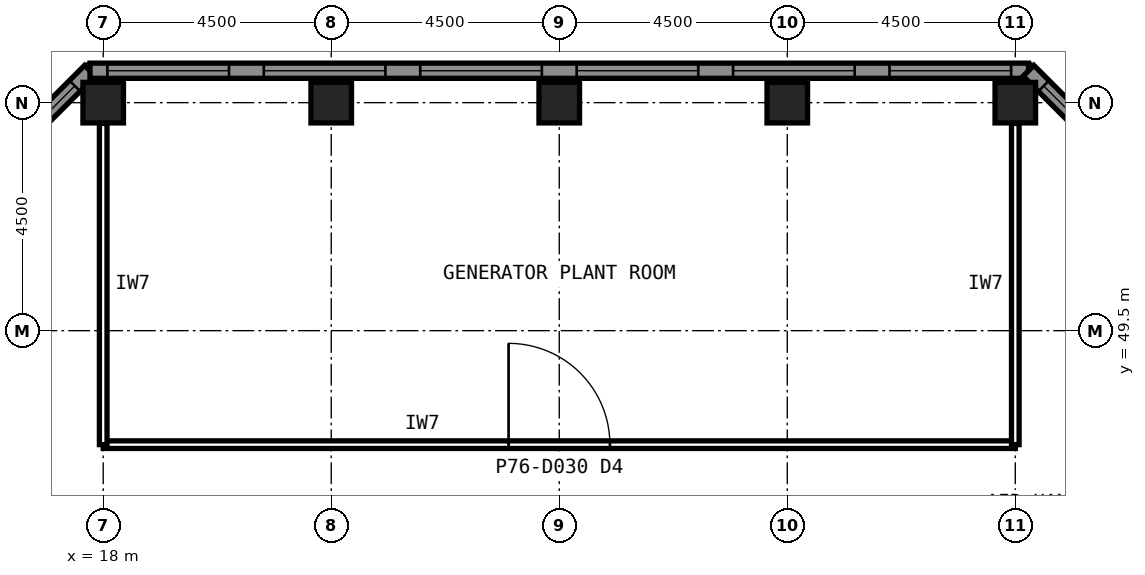
"""IFC4 building model, lengths in metres.
Left out: names, types, materials, properties, quantities, classifications, styles, units other than length and angle.
Written with IfcOpenShell. Run it as: python <this file> out.ifc"""

import sys

from ifc_helpers import new_model, si_unit, direction, frame, frame_2d, origin, origin_2d, place, context, subcontext, project, spatial, polyline, rectangle, hollow_rectangle, outline, extrude, element, fill, save


model = new_model("IFC4")
c1 = context("Model", 3, precision=1e-05, world=origin(), true_north=direction((0.0, 1.0)))
c2 = subcontext(c1, "Body", "Model", "MODEL_VIEW")
j1 = project(units=[si_unit("LENGTHUNIT", "METRE"), si_unit("PLANEANGLEUNIT", "RADIAN")], contexts=[c1])
p1 = place(None, origin())
s1 = spatial("IfcSite", under=j1, at=p1, CompositionType="ELEMENT")
p2 = place(p1, origin())
s2 = spatial("IfcBuilding", under=s1, at=p2, CompositionType="ELEMENT")
p3 = place(p2, frame((0.0, 0.0, 320.1)))
s3 = spatial("IfcBuildingStorey", under=s2, at=p3, CompositionType="ELEMENT", Elevation=320.1)
for number, where, z_axis, x_axis in (
    (1, (36.0, 54.0, 0.0), (0.0, 0.0, 1.0), (1.0, 0.0, 0.0)),
    (2, (31.5, 54.0, 0.0), (0.0, 0.0, 1.0), (1.0, 0.0, 0.0)),
    (3, (27.0, 54.0, 0.0), (0.0, 0.0, 1.0), (1.0, 0.0, 0.0)),
    (4, (22.5, 54.0, 0.0), (0.0, 0.0, 1.0), (1.0, 0.0, 0.0)),
    (5, (18.0, 54.0, 0.0), (0.0, 0.0, 1.0), (1.0, 0.0, 0.0)),
):
    element("IfcColumn", number, at=place(p3, frame(where, z_axis=z_axis, x_axis=x_axis)), inside=s3, PredefinedType="COLUMN", context=c2, shape_type="SweptSolid", body=[
        extrude(hollow_rectangle(XDim=0.8, YDim=0.8, WallThickness=0.045, at=origin_2d()), origin(), (0.0, 0.0, 1.0), 21.427),
    ])
p4 = place(p3, frame((-0.63, 36.261, 0.0), z_axis=(0.0, 0.0, 1.0), x_axis=(0.707106781187, 0.707106781187, 0.0)))
e6 = element("IfcWall", 6, at=p4, inside=s3, PredefinedType="SOLIDWALL", context=c2, shape_type="SweptSolid", body=[
    extrude(outline(polyline([(0.0, 0.0), (25.978, 0.0), (25.978, 23.789), (0.0, 18.278), (0.0, 0.0)])), frame((0.0, 0.15, 0.0), z_axis=(0.0, -1.0, 0.0), x_axis=(1.0, 0.0, 0.0)), (0.0, 0.0, 1.0), 0.3),
])
p5 = place(p4, frame((0.424, 0.0, 1.2)))
e7 = element("IfcOpeningElement", 7, at=p5, cuts=e6, PredefinedType="OPENING", context=c2, shape_type="SweptSolid", body=[
    extrude(rectangle(XDim=2.4, YDim=2.4, at=frame_2d((1.2, 1.2))), frame((0.0, 0.16, 0.0), z_axis=(0.0, -1.0, 0.0), x_axis=(1.0, 0.0, 0.0)), (0.0, 0.0, 1.0), 0.32),
])
p6 = place(p4, frame((3.671, 0.0, 1.2)))
e8 = element("IfcOpeningElement", 8, at=p6, cuts=e6, PredefinedType="OPENING", context=c2, shape_type="SweptSolid", body=[
    extrude(rectangle(XDim=2.4, YDim=2.4, at=frame_2d((1.2, 1.2))), frame((0.0, 0.16, 0.0), z_axis=(0.0, -1.0, 0.0), x_axis=(1.0, 0.0, 0.0)), (0.0, 0.0, 1.0), 0.32),
])
p7 = place(p4, frame((6.918, 0.0, 1.2)))
e9 = element("IfcOpeningElement", 9, at=p7, cuts=e6, PredefinedType="OPENING", context=c2, shape_type="SweptSolid", body=[
    extrude(rectangle(XDim=2.4, YDim=2.4, at=frame_2d((1.2, 1.2))), frame((0.0, 0.16, 0.0), z_axis=(0.0, -1.0, 0.0), x_axis=(1.0, 0.0, 0.0)), (0.0, 0.0, 1.0), 0.32),
])
p8 = place(p4, frame((10.165, 0.0, 1.2)))
e10 = element("IfcOpeningElement", 10, at=p8, cuts=e6, PredefinedType="OPENING", context=c2, shape_type="SweptSolid", body=[
    extrude(rectangle(XDim=2.4, YDim=2.4, at=frame_2d((1.2, 1.2))), frame((0.0, 0.16, 0.0), z_axis=(0.0, -1.0, 0.0), x_axis=(1.0, 0.0, 0.0)), (0.0, 0.0, 1.0), 0.32),
])
p9 = place(p4, frame((13.412, 0.0, 11.15)))
e11 = element("IfcOpeningElement", 11, at=p9, cuts=e6, PredefinedType="OPENING", context=c2, shape_type="SweptSolid", body=[
    extrude(rectangle(XDim=2.4, YDim=2.4, at=frame_2d((1.2, 1.2))), frame((0.0, 0.16, 0.0), z_axis=(0.0, -1.0, 0.0), x_axis=(1.0, 0.0, 0.0)), (0.0, 0.0, 1.0), 0.32),
])
p10 = place(p4, frame((16.66, 0.0, 11.3)))
e12 = element("IfcOpeningElement", 12, at=p10, cuts=e6, PredefinedType="OPENING", context=c2, shape_type="SweptSolid", body=[
    extrude(rectangle(XDim=2.4, YDim=2.4, at=frame_2d((1.2, 1.2))), frame((0.0, 0.16, 0.0), z_axis=(0.0, -1.0, 0.0), x_axis=(1.0, 0.0, 0.0)), (0.0, 0.0, 1.0), 0.32),
])
p11 = place(p4, frame((19.907, 0.0, 1.2)))
e13 = element("IfcOpeningElement", 13, at=p11, cuts=e6, PredefinedType="OPENING", context=c2, shape_type="SweptSolid", body=[
    extrude(rectangle(XDim=2.4, YDim=2.4, at=frame_2d((1.2, 1.2))), frame((0.0, 0.16, 0.0), z_axis=(0.0, -1.0, 0.0), x_axis=(1.0, 0.0, 0.0)), (0.0, 0.0, 1.0), 0.32),
])
p12 = place(p4, frame((23.154, 0.0, 1.2)))
e14 = element("IfcOpeningElement", 14, at=p12, cuts=e6, PredefinedType="OPENING", context=c2, shape_type="SweptSolid", body=[
    extrude(rectangle(XDim=2.4, YDim=2.4, at=frame_2d((1.2, 1.2))), frame((0.0, 0.16, 0.0), z_axis=(0.0, -1.0, 0.0), x_axis=(1.0, 0.0, 0.0)), (0.0, 0.0, 1.0), 0.32),
])
p13 = place(p3, frame((17.739, 54.63, 0.0), z_axis=(0.0, 0.0, 1.0), x_axis=(1.0, 0.0, 0.0)))
e15 = element("IfcWall", 15, at=p13, inside=s3, PredefinedType="SOLIDWALL", context=c2, shape_type="SweptSolid", body=[
    extrude(rectangle(XDim=18.522, YDim=0.3, at=frame_2d((9.261, 0.0))), origin(), (0.0, 0.0, 1.0), 23.789),
])
p14 = place(p13, frame((0.344, 0.0, 17.4)))
e16 = element("IfcOpeningElement", 16, at=p14, cuts=e15, PredefinedType="OPENING", context=c2, shape_type="SweptSolid", body=[
    extrude(rectangle(XDim=2.4, YDim=2.4, at=frame_2d((1.2, 1.2))), frame((0.0, 0.16, 0.0), z_axis=(0.0, -1.0, 0.0), x_axis=(1.0, 0.0, 0.0)), (0.0, 0.0, 1.0), 0.32),
])
p15 = place(p13, frame((3.43, 0.0, 1.65)))
e17 = element("IfcOpeningElement", 17, at=p15, cuts=e15, PredefinedType="OPENING", context=c2, shape_type="SweptSolid", body=[
    extrude(rectangle(XDim=2.4, YDim=2.4, at=frame_2d((1.2, 1.2))), frame((0.0, 0.16, 0.0), z_axis=(0.0, -1.0, 0.0), x_axis=(1.0, 0.0, 0.0)), (0.0, 0.0, 1.0), 0.32),
])
p16 = place(p13, frame((6.518, 0.0, 1.2)))
e18 = element("IfcOpeningElement", 18, at=p16, cuts=e15, PredefinedType="OPENING", context=c2, shape_type="SweptSolid", body=[
    extrude(rectangle(XDim=2.4, YDim=2.4, at=frame_2d((1.2, 1.2))), frame((0.0, 0.16, 0.0), z_axis=(0.0, -1.0, 0.0), x_axis=(1.0, 0.0, 0.0)), (0.0, 0.0, 1.0), 0.32),
])
p17 = place(p13, frame((9.604, 0.0, 1.2)))
e19 = element("IfcOpeningElement", 19, at=p17, cuts=e15, PredefinedType="OPENING", context=c2, shape_type="SweptSolid", body=[
    extrude(rectangle(XDim=2.4, YDim=2.4, at=frame_2d((1.2, 1.2))), frame((0.0, 0.16, 0.0), z_axis=(0.0, -1.0, 0.0), x_axis=(1.0, 0.0, 0.0)), (0.0, 0.0, 1.0), 0.32),
])
p18 = place(p13, frame((12.691, 0.0, 1.65)))
e20 = element("IfcOpeningElement", 20, at=p18, cuts=e15, PredefinedType="OPENING", context=c2, shape_type="SweptSolid", body=[
    extrude(rectangle(XDim=2.4, YDim=2.4, at=frame_2d((1.2, 1.2))), frame((0.0, 0.16, 0.0), z_axis=(0.0, -1.0, 0.0), x_axis=(1.0, 0.0, 0.0)), (0.0, 0.0, 1.0), 0.32),
])
p19 = place(p13, frame((15.779, 0.0, 17.4)))
e21 = element("IfcOpeningElement", 21, at=p19, cuts=e15, PredefinedType="OPENING", context=c2, shape_type="SweptSolid", body=[
    extrude(rectangle(XDim=2.4, YDim=2.4, at=frame_2d((1.2, 1.2))), frame((0.0, 0.16, 0.0), z_axis=(0.0, -1.0, 0.0), x_axis=(1.0, 0.0, 0.0)), (0.0, 0.0, 1.0), 0.32),
])
p20 = place(p3, frame((36.261, 54.63, 0.0), z_axis=(0.0, 0.0, 1.0), x_axis=(0.707106781187, -0.707106781187, 0.0)))
e22 = element("IfcWall", 22, at=p20, inside=s3, PredefinedType="SOLIDWALL", context=c2, shape_type="SweptSolid", body=[
    extrude(outline(polyline([(0.0, 0.0), (25.978, 0.0), (25.978, 18.278), (0.0, 23.789), (0.0, 0.0)])), frame((0.0, 0.15, 0.0), z_axis=(0.0, -1.0, 0.0), x_axis=(1.0, 0.0, 0.0)), (0.0, 0.0, 1.0), 0.3),
])
p21 = place(p20, frame((0.424, 0.0, 1.2)))
e23 = element("IfcOpeningElement", 23, at=p21, cuts=e22, PredefinedType="OPENING", context=c2, shape_type="SweptSolid", body=[
    extrude(rectangle(XDim=2.4, YDim=2.4, at=frame_2d((1.2, 1.2))), frame((0.0, 0.16, 0.0), z_axis=(0.0, -1.0, 0.0), x_axis=(1.0, 0.0, 0.0)), (0.0, 0.0, 1.0), 0.32),
])
p22 = place(p20, frame((3.671, 0.0, 1.2)))
e24 = element("IfcOpeningElement", 24, at=p22, cuts=e22, PredefinedType="OPENING", context=c2, shape_type="SweptSolid", body=[
    extrude(rectangle(XDim=2.4, YDim=2.4, at=frame_2d((1.2, 1.2))), frame((0.0, 0.16, 0.0), z_axis=(0.0, -1.0, 0.0), x_axis=(1.0, 0.0, 0.0)), (0.0, 0.0, 1.0), 0.32),
])
p23 = place(p20, frame((6.918, 0.0, 11.3)))
e25 = element("IfcOpeningElement", 25, at=p23, cuts=e22, PredefinedType="OPENING", context=c2, shape_type="SweptSolid", body=[
    extrude(rectangle(XDim=2.4, YDim=2.4, at=frame_2d((1.2, 1.2))), frame((0.0, 0.16, 0.0), z_axis=(0.0, -1.0, 0.0), x_axis=(1.0, 0.0, 0.0)), (0.0, 0.0, 1.0), 0.32),
])
p24 = place(p20, frame((10.165, 0.0, 11.15)))
e26 = element("IfcOpeningElement", 26, at=p24, cuts=e22, PredefinedType="OPENING", context=c2, shape_type="SweptSolid", body=[
    extrude(rectangle(XDim=2.4, YDim=2.4, at=frame_2d((1.2, 1.2))), frame((0.0, 0.16, 0.0), z_axis=(0.0, -1.0, 0.0), x_axis=(1.0, 0.0, 0.0)), (0.0, 0.0, 1.0), 0.32),
])
p25 = place(p20, frame((13.412, 0.0, 1.2)))
e27 = element("IfcOpeningElement", 27, at=p25, cuts=e22, PredefinedType="OPENING", context=c2, shape_type="SweptSolid", body=[
    extrude(rectangle(XDim=2.4, YDim=2.4, at=frame_2d((1.2, 1.2))), frame((0.0, 0.16, 0.0), z_axis=(0.0, -1.0, 0.0), x_axis=(1.0, 0.0, 0.0)), (0.0, 0.0, 1.0), 0.32),
])
p26 = place(p20, frame((16.66, 0.0, 1.2)))
e28 = element("IfcOpeningElement", 28, at=p26, cuts=e22, PredefinedType="OPENING", context=c2, shape_type="SweptSolid", body=[
    extrude(rectangle(XDim=2.4, YDim=2.4, at=frame_2d((1.2, 1.2))), frame((0.0, 0.16, 0.0), z_axis=(0.0, -1.0, 0.0), x_axis=(1.0, 0.0, 0.0)), (0.0, 0.0, 1.0), 0.32),
])
p27 = place(p20, frame((19.907, 0.0, 1.2)))
e29 = element("IfcOpeningElement", 29, at=p27, cuts=e22, PredefinedType="OPENING", context=c2, shape_type="SweptSolid", body=[
    extrude(rectangle(XDim=2.4, YDim=2.4, at=frame_2d((1.2, 1.2))), frame((0.0, 0.16, 0.0), z_axis=(0.0, -1.0, 0.0), x_axis=(1.0, 0.0, 0.0)), (0.0, 0.0, 1.0), 0.32),
])
p28 = place(p20, frame((23.154, 0.0, 1.2)))
e30 = element("IfcOpeningElement", 30, at=p28, cuts=e22, PredefinedType="OPENING", context=c2, shape_type="SweptSolid", body=[
    extrude(rectangle(XDim=2.4, YDim=2.4, at=frame_2d((1.2, 1.2))), frame((0.0, 0.16, 0.0), z_axis=(0.0, -1.0, 0.0), x_axis=(1.0, 0.0, 0.0)), (0.0, 0.0, 1.0), 0.32),
])
p29 = place(p3, frame((18.0, 47.25, 0.0), z_axis=(0.0, 0.0, 1.0), x_axis=(1.0, 0.0, 0.0)))
e31 = element("IfcWall", 31, at=p29, inside=s3, PredefinedType="PARTITIONING", context=c2, shape_type="SweptSolid", body=[
    extrude(rectangle(XDim=18.0, YDim=0.15, at=frame_2d((9.0, 0.0))), origin(), (0.0, 0.0, 1.0), 4.246),
])
p30 = place(p29, frame((8.0, 0.0, 0.0)))
e32 = element("IfcOpeningElement", 32, at=p30, cuts=e31, PredefinedType="OPENING", context=c2, shape_type="SweptSolid", body=[
    extrude(rectangle(XDim=2.0, YDim=2.4, at=frame_2d((1.0, 1.2))), frame((0.0, 0.085, 0.0), z_axis=(0.0, -1.0, 0.0), x_axis=(1.0, 0.0, 0.0)), (0.0, 0.0, 1.0), 0.17),
])
for number, where, z_axis, x_axis in (
    (33, (36.0, 47.25, 0.0), (0.0, 0.0, 1.0), (0.0, 1.0, 0.0)),
    (34, (18.0, 53.59, 0.0), (0.0, 0.0, 1.0), (0.0, -1.0, 0.0)),
):
    element("IfcWall", number, at=place(p3, frame(where, z_axis=z_axis, x_axis=x_axis)), inside=s3, PredefinedType="PARTITIONING", context=c2, shape_type="SweptSolid", body=[
        extrude(rectangle(XDim=6.34, YDim=0.15, at=frame_2d((3.17, 0.0))), origin(), (0.0, 0.0, 1.0), 4.246),
    ])
p31 = place(p12, origin())
e35 = element("IfcWindow", 35, at=p31, inside=s3, PartitioningType="SINGLE_PANEL", PredefinedType="USERDEFINED", context=c2, shape_type="SweptSolid", body=[
    extrude(rectangle(XDim=2.4, YDim=2.4, at=frame_2d((1.2, 1.2))), frame((0.0, 0.03, 0.0), z_axis=(0.0, -1.0, 0.0), x_axis=(1.0, 0.0, 0.0)), (0.0, 0.0, 1.0), 0.06),
])
fill(e14, e35)
p32 = place(p14, origin())
e36 = element("IfcWindow", 36, at=p32, inside=s3, PartitioningType="SINGLE_PANEL", PredefinedType="USERDEFINED", context=c2, shape_type="SweptSolid", body=[
    extrude(rectangle(XDim=2.4, YDim=2.4, at=frame_2d((1.2, 1.2))), frame((0.0, 0.03, 0.0), z_axis=(0.0, -1.0, 0.0), x_axis=(1.0, 0.0, 0.0)), (0.0, 0.0, 1.0), 0.06),
])
fill(e16, e36)
p33 = place(p15, origin())
e37 = element("IfcWindow", 37, at=p33, inside=s3, PartitioningType="SINGLE_PANEL", PredefinedType="USERDEFINED", context=c2, shape_type="SweptSolid", body=[
    extrude(rectangle(XDim=2.4, YDim=2.4, at=frame_2d((1.2, 1.2))), frame((0.0, 0.03, 0.0), z_axis=(0.0, -1.0, 0.0), x_axis=(1.0, 0.0, 0.0)), (0.0, 0.0, 1.0), 0.06),
])
fill(e17, e37)
p34 = place(p16, origin())
e38 = element("IfcWindow", 38, at=p34, inside=s3, PartitioningType="SINGLE_PANEL", PredefinedType="USERDEFINED", context=c2, shape_type="SweptSolid", body=[
    extrude(rectangle(XDim=2.4, YDim=2.4, at=frame_2d((1.2, 1.2))), frame((0.0, 0.03, 0.0), z_axis=(0.0, -1.0, 0.0), x_axis=(1.0, 0.0, 0.0)), (0.0, 0.0, 1.0), 0.06),
])
fill(e18, e38)
p35 = place(p17, origin())
e39 = element("IfcWindow", 39, at=p35, inside=s3, PartitioningType="SINGLE_PANEL", PredefinedType="USERDEFINED", context=c2, shape_type="SweptSolid", body=[
    extrude(rectangle(XDim=2.4, YDim=2.4, at=frame_2d((1.2, 1.2))), frame((0.0, 0.03, 0.0), z_axis=(0.0, -1.0, 0.0), x_axis=(1.0, 0.0, 0.0)), (0.0, 0.0, 1.0), 0.06),
])
fill(e19, e39)
p36 = place(p18, origin())
e40 = element("IfcWindow", 40, at=p36, inside=s3, PartitioningType="SINGLE_PANEL", PredefinedType="USERDEFINED", context=c2, shape_type="SweptSolid", body=[
    extrude(rectangle(XDim=2.4, YDim=2.4, at=frame_2d((1.2, 1.2))), frame((0.0, 0.03, 0.0), z_axis=(0.0, -1.0, 0.0), x_axis=(1.0, 0.0, 0.0)), (0.0, 0.0, 1.0), 0.06),
])
fill(e20, e40)
p37 = place(p19, origin())
e41 = element("IfcWindow", 41, at=p37, inside=s3, PartitioningType="SINGLE_PANEL", PredefinedType="USERDEFINED", context=c2, shape_type="SweptSolid", body=[
    extrude(rectangle(XDim=2.4, YDim=2.4, at=frame_2d((1.2, 1.2))), frame((0.0, 0.03, 0.0), z_axis=(0.0, -1.0, 0.0), x_axis=(1.0, 0.0, 0.0)), (0.0, 0.0, 1.0), 0.06),
])
fill(e21, e41)
p38 = place(p21, origin())
e42 = element("IfcWindow", 42, at=p38, inside=s3, PartitioningType="SINGLE_PANEL", PredefinedType="USERDEFINED", context=c2, shape_type="SweptSolid", body=[
    extrude(rectangle(XDim=2.4, YDim=2.4, at=frame_2d((1.2, 1.2))), frame((0.0, 0.03, 0.0), z_axis=(0.0, -1.0, 0.0), x_axis=(1.0, 0.0, 0.0)), (0.0, 0.0, 1.0), 0.06),
])
fill(e23, e42)
p39 = place(p30, origin())
e43 = element("IfcDoor", 43, at=p39, inside=s3, OperationType="SINGLE_SWING_LEFT", PredefinedType="DOOR", context=c2, shape_type="SweptSolid", body=[
    extrude(rectangle(XDim=2.0, YDim=2.4, at=frame_2d((1.0, 1.2))), frame((0.0, 0.025, 0.0), z_axis=(0.0, -1.0, 0.0), x_axis=(1.0, 0.0, 0.0)), (0.0, 0.0, 1.0), 0.05),
])
fill(e32, e43)
save(model, sys.argv[1])
